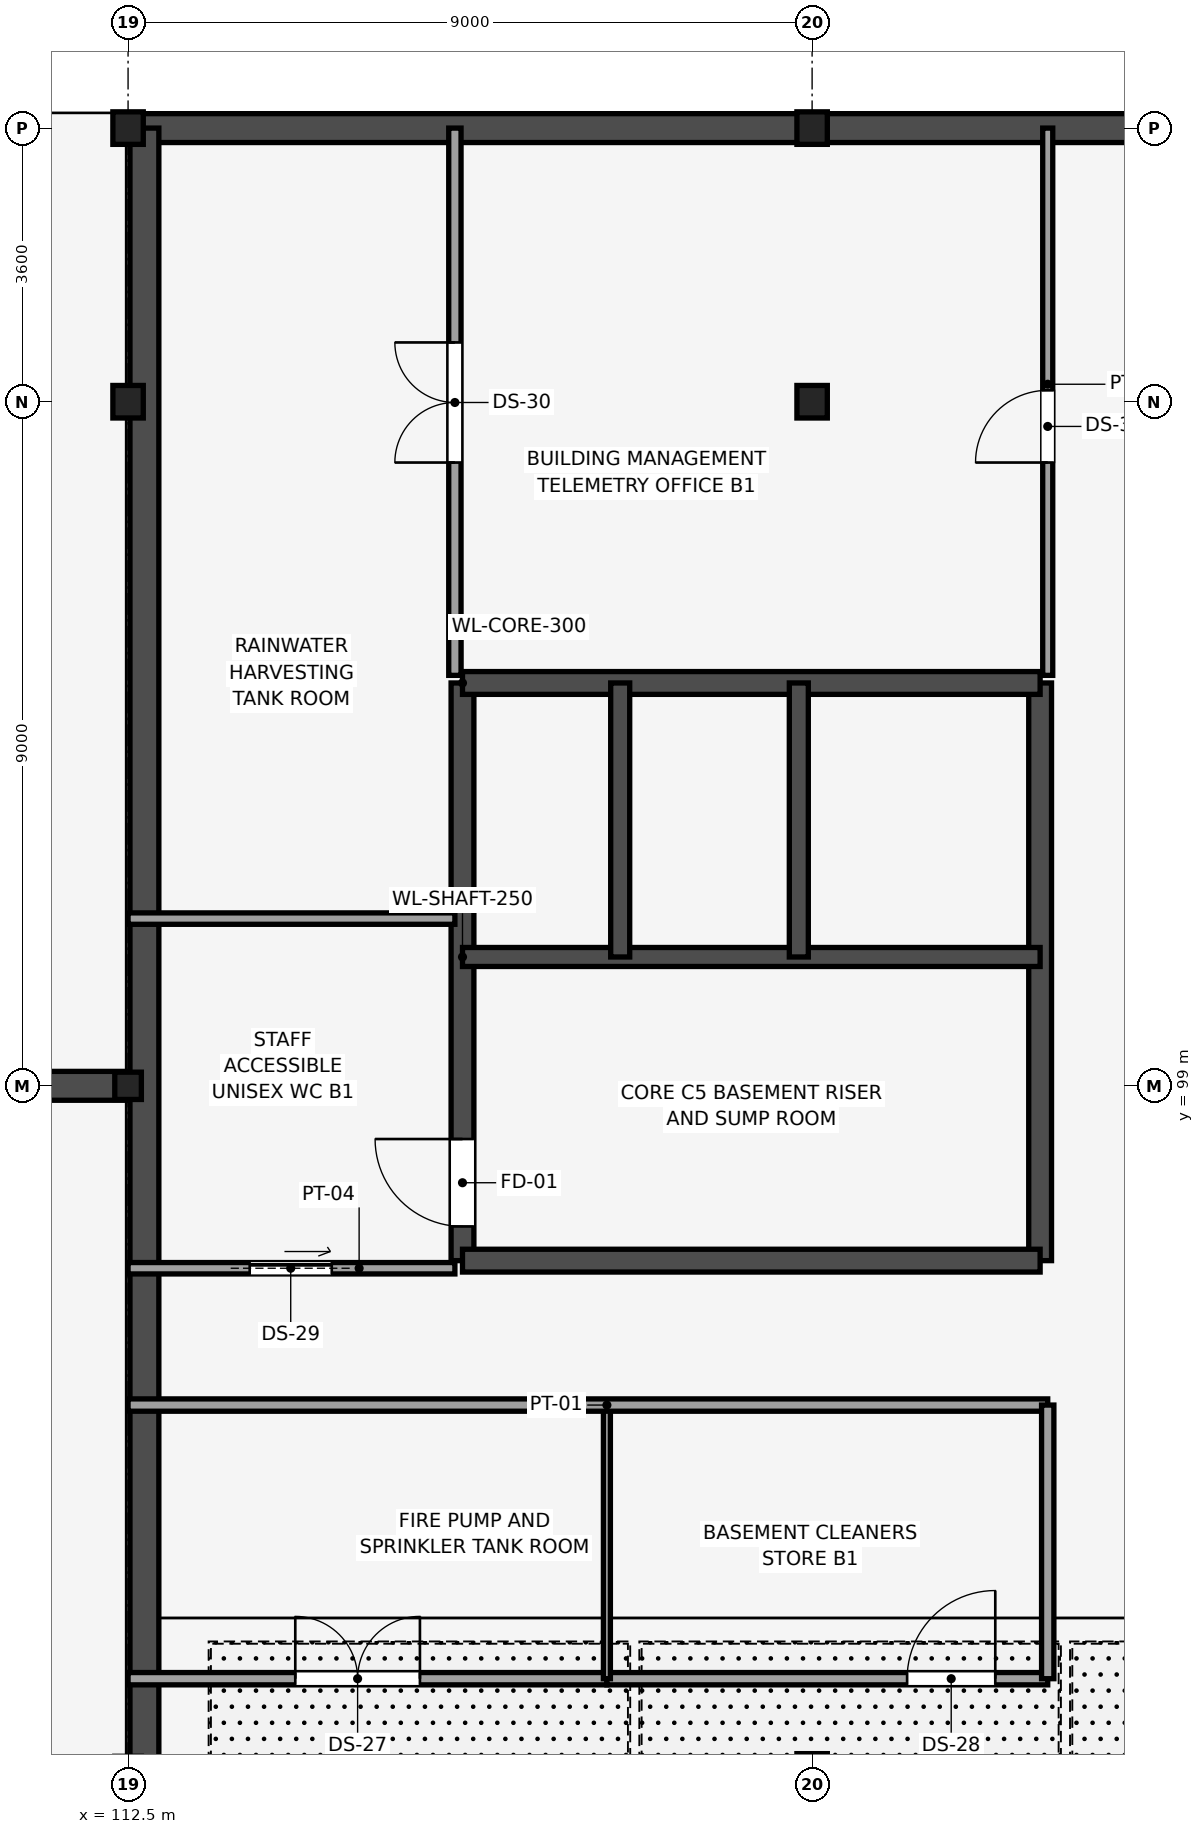
"""IFC4 building model, lengths in metres.
Left out: names, types, materials, properties, quantities, classifications, styles, units other than length and angle.
Written with IfcOpenShell. Run it as: python <this file> out.ifc"""

import sys

from ifc_helpers import new_model, si_unit, direction, frame, frame_2d, origin, origin_2d, place, context, subcontext, project, spatial, rectangle, i_section, extrude, element, fill, save


model = new_model("IFC4")
c1 = context("Model", 3, precision=1e-05, world=origin(), true_north=direction((0.0, 1.0)))
c2 = subcontext(c1, "Body", "Model", "MODEL_VIEW")
j1 = project(units=[si_unit("LENGTHUNIT", "METRE"), si_unit("PLANEANGLEUNIT", "RADIAN")], contexts=[c1])
p1 = place(None, origin())
s1 = spatial("IfcSite", under=j1, at=p1, CompositionType="ELEMENT")
p2 = place(p1, origin())
s2 = spatial("IfcBuilding", under=s1, at=p2, CompositionType="ELEMENT")
p3 = place(p2, frame((0.0, 0.0, -4.5)))
s3 = spatial("IfcBuildingStorey", under=s2, at=p3, CompositionType="ELEMENT", Elevation=-4.5)
p4 = place(p3, frame((112.5, 99.0, 0.0), z_axis=(0.0, 0.0, 1.0), x_axis=(1.0, 0.0, 0.0)))
e1 = element("IfcColumn", 1, at=p4, inside=s3, PredefinedType="COLUMN", context=c2, shape_type="SweptSolid", body=[
    extrude(i_section(OverallWidth=0.35, OverallDepth=0.359, WebThickness=0.016, FlangeThickness=0.024, FilletRadius=0.014, at=origin_2d()), origin(), (0.0, 0.0, 1.0), 4.5),
])
for number, where, z_axis, x_axis in (
    (2, (112.5, 108.0, 0.0), (0.0, 0.0, 1.0), (1.0, 0.0, 0.0)),
    (3, (112.5, 111.6, 0.0), (0.0, 0.0, 1.0), (1.0, 0.0, 0.0)),
    (4, (121.5, 90.0, 0.0), (0.0, 0.0, 1.0), (1.0, 0.0, 0.0)),
    (5, (121.5, 108.0, 0.0), (0.0, 0.0, 1.0), (1.0, 0.0, 0.0)),
    (6, (121.5, 111.6, 0.0), (0.0, 0.0, 1.0), (1.0, 0.0, 0.0)),
):
    element("IfcColumn", number, at=place(p3, frame(where, z_axis=z_axis, x_axis=x_axis)), inside=s3, PredefinedType="COLUMN", context=c2, shape_type="SweptSolid", body=[
        extrude(i_section(OverallWidth=0.4, OverallDepth=0.428, WebThickness=0.02, FlangeThickness=0.028, FilletRadius=0.016, at=origin_2d()), origin(), (0.0, 0.0, 1.0), 4.5),
    ])
p5 = place(p3, frame((116.9, 96.7, 0.0), z_axis=(0.0, 0.0, 1.0), x_axis=(0.0, 1.0, 0.0)))
e7 = element("IfcWall", 7, at=p5, inside=s3, PredefinedType="SHEAR", context=c2, shape_type="SweptSolid", body=[
    extrude(rectangle(XDim=7.6, YDim=0.3, at=frame_2d((3.8, 0.0))), origin(), (0.0, 0.0, 1.0), 4.5),
])
p6 = place(p5, frame((0.45, 0.0, 0.0)))
e8 = element("IfcOpeningElement", 8, at=p6, cuts=e7, PredefinedType="OPENING", context=c2, shape_type="SweptSolid", body=[
    extrude(rectangle(XDim=1.15, YDim=2.15, at=frame_2d((0.575, 1.075))), frame((0.0, 0.16, 0.0), z_axis=(0.0, -1.0, 0.0), x_axis=(1.0, 0.0, 0.0)), (0.0, 0.0, 1.0), 0.32),
])
for number, where, z_axis, x_axis in (
    (9, (124.5, 96.7, 0.0), (0.0, 0.0, 1.0), (0.0, 1.0, 0.0)),
    (10, (116.9, 96.7, 0.0), (0.0, 0.0, 1.0), (1.0, 0.0, 0.0)),
    (11, (116.9, 104.3, 0.0), (0.0, 0.0, 1.0), (1.0, 0.0, 0.0)),
):
    element("IfcWall", number, at=place(p3, frame(where, z_axis=z_axis, x_axis=x_axis)), inside=s3, PredefinedType="SHEAR", context=c2, shape_type="SweptSolid", body=[
        extrude(rectangle(XDim=7.6, YDim=0.3, at=frame_2d((3.8, 0.0))), origin(), (0.0, 0.0, 1.0), 4.5),
    ])
p7 = place(p3, frame((116.9, 100.695, 0.0), z_axis=(0.0, 0.0, 1.0), x_axis=(1.0, 0.0, 0.0)))
e12 = element("IfcWall", 12, at=p7, inside=s3, PredefinedType="SHEAR", context=c2, shape_type="SweptSolid", body=[
    extrude(rectangle(XDim=7.6, YDim=0.25, at=frame_2d((3.8, 0.0))), origin(), (0.0, 0.0, 1.0), 4.5),
])
for number, where, z_axis, x_axis in (
    (13, (118.975, 100.695, 0.0), (0.0, 0.0, 1.0), (0.0, 1.0, 0.0)),
    (14, (121.325, 100.695, 0.0), (0.0, 0.0, 1.0), (0.0, 1.0, 0.0)),
):
    element("IfcWall", number, at=place(p3, frame(where, z_axis=z_axis, x_axis=x_axis)), inside=s3, PredefinedType="SHEAR", context=c2, shape_type="SweptSolid", body=[
        extrude(rectangle(XDim=3.605, YDim=0.25, at=frame_2d((1.802, 0.0))), origin(), (0.0, 0.0, 1.0), 4.5),
    ])
p8 = place(p3, frame((103.5, 99.0, 0.0), z_axis=(0.0, 0.0, 1.0), x_axis=(1.0, 0.0, 0.0)))
e15 = element("IfcWall", 15, at=p8, inside=s3, PredefinedType="SHEAR", context=c2, shape_type="SweptSolid", body=[
    extrude(rectangle(XDim=9.0, YDim=0.38, at=frame_2d((4.5, 0.0))), origin(), (0.0, 0.0, 1.0), 4.26),
])
p9 = place(p3, frame((112.525, 111.6, 0.0), z_axis=(0.0, 0.0, 1.0), x_axis=(1.0, 0.0, 0.0)))
e16 = element("IfcWall", 16, at=p9, inside=s3, PredefinedType="SHEAR", context=c2, shape_type="SweptSolid", body=[
    extrude(rectangle(XDim=35.975, YDim=0.38, at=frame_2d((17.988, 0.0))), origin(), (0.0, 0.0, 1.0), 4.26),
])
p10 = place(p3, frame((112.715, 72.0, 0.0), z_axis=(0.0, 0.0, 1.0), x_axis=(0.0, 1.0, 0.0)))
e17 = element("IfcWall", 17, at=p10, inside=s3, PredefinedType="SHEAR", context=c2, shape_type="SweptSolid", body=[
    extrude(rectangle(XDim=39.6, YDim=0.38, at=frame_2d((19.8, 0.0))), origin(), (0.0, 0.0, 1.0), 4.26),
])
p11 = place(p3, frame((112.5, 91.2, 0.0), z_axis=(0.0, 0.0, 1.0), x_axis=(1.0, 0.0, 0.0)))
e18 = element("IfcWall", 18, at=p11, inside=s3, PredefinedType="PARTITIONING", context=c2, shape_type="SweptSolid", body=[
    extrude(rectangle(XDim=6.3, YDim=0.162, at=frame_2d((3.15, 0.0))), origin(), (0.0, 0.0, 1.0), 4.26),
])
p12 = place(p11, frame((2.2, 0.0, 0.0)))
e19 = element("IfcOpeningElement", 19, at=p12, cuts=e18, PredefinedType="OPENING", context=c2, shape_type="SweptSolid", body=[
    extrude(rectangle(XDim=1.64, YDim=2.25, at=frame_2d((0.82, 1.125))), frame((0.0, 0.091, 0.0), z_axis=(0.0, -1.0, 0.0), x_axis=(1.0, 0.0, 0.0)), (0.0, 0.0, 1.0), 0.182),
])
p13 = place(p3, frame((118.8, 91.2, 0.0), z_axis=(0.0, 0.0, 1.0), x_axis=(1.0, 0.0, 0.0)))
e20 = element("IfcWall", 20, at=p13, inside=s3, PredefinedType="PARTITIONING", context=c2, shape_type="SweptSolid", body=[
    extrude(rectangle(XDim=5.8, YDim=0.162, at=frame_2d((2.9, 0.0))), origin(), (0.0, 0.0, 1.0), 4.26),
])
p14 = place(p13, frame((3.95, 0.0, 0.0)))
e21 = element("IfcOpeningElement", 21, at=p14, cuts=e20, PredefinedType="OPENING", context=c2, shape_type="SweptSolid", body=[
    extrude(rectangle(XDim=1.16, YDim=2.2, at=frame_2d((0.58, 1.1))), frame((0.0, 0.091, 0.0), z_axis=(0.0, -1.0, 0.0), x_axis=(1.0, 0.0, 0.0)), (0.0, 0.0, 1.0), 0.182),
])
p15 = place(p3, frame((118.8, 91.2, 0.0), z_axis=(0.0, 0.0, 1.0), x_axis=(0.0, 1.0, 0.0)))
e22 = element("IfcWall", 22, at=p15, inside=s3, PredefinedType="PARTITIONING", context=c2, shape_type="SweptSolid", body=[
    extrude(rectangle(XDim=3.6, YDim=0.092, at=frame_2d((1.8, 0.0))), origin(), (0.0, 0.0, 1.0), 4.26),
])
p16 = place(p3, frame((112.5, 94.8, 0.0), z_axis=(0.0, 0.0, 1.0), x_axis=(1.0, 0.0, 0.0)))
e23 = element("IfcWall", 23, at=p16, inside=s3, PredefinedType="PARTITIONING", context=c2, shape_type="SweptSolid", body=[
    extrude(rectangle(XDim=12.1, YDim=0.162, at=frame_2d((6.05, 0.0))), origin(), (0.0, 0.0, 1.0), 4.26),
])
p17 = place(p3, frame((124.6, 91.2, 0.0), z_axis=(0.0, 0.0, 1.0), x_axis=(0.0, 1.0, 0.0)))
e24 = element("IfcWall", 24, at=p17, inside=s3, PredefinedType="PARTITIONING", context=c2, shape_type="SweptSolid", body=[
    extrude(rectangle(XDim=3.6, YDim=0.162, at=frame_2d((1.8, 0.0))), origin(), (0.0, 0.0, 1.0), 4.26),
])
p18 = place(p3, frame((112.5, 96.6, 0.0), z_axis=(0.0, 0.0, 1.0), x_axis=(1.0, 0.0, 0.0)))
e25 = element("IfcWall", 25, at=p18, inside=s3, PredefinedType="PARTITIONING", context=c2, shape_type="SweptSolid", body=[
    extrude(rectangle(XDim=4.3, YDim=0.15, at=frame_2d((2.15, 0.0))), origin(), (0.0, 0.0, 1.0), 4.26),
])
p19 = place(p18, frame((1.6, 0.0, 0.0)))
e26 = element("IfcOpeningElement", 26, at=p19, cuts=e25, PredefinedType="OPENING", context=c2, shape_type="SweptSolid", body=[
    extrude(rectangle(XDim=1.08, YDim=2.2, at=frame_2d((0.54, 1.1))), frame((0.0, 0.085, 0.0), z_axis=(0.0, -1.0, 0.0), x_axis=(1.0, 0.0, 0.0)), (0.0, 0.0, 1.0), 0.17),
])
p20 = place(p3, frame((112.5, 101.2, 0.0), z_axis=(0.0, 0.0, 1.0), x_axis=(1.0, 0.0, 0.0)))
e27 = element("IfcWall", 27, at=p20, inside=s3, PredefinedType="PARTITIONING", context=c2, shape_type="SweptSolid", body=[
    extrude(rectangle(XDim=4.3, YDim=0.15, at=frame_2d((2.15, 0.0))), origin(), (0.0, 0.0, 1.0), 4.26),
])
p21 = place(p3, frame((116.8, 104.4, 0.0), z_axis=(0.0, 0.0, 1.0), x_axis=(0.0, 1.0, 0.0)))
e28 = element("IfcWall", 28, at=p21, inside=s3, PredefinedType="PARTITIONING", context=c2, shape_type="SweptSolid", body=[
    extrude(rectangle(XDim=7.2, YDim=0.162, at=frame_2d((3.6, 0.0))), origin(), (0.0, 0.0, 1.0), 4.26),
])
p22 = place(p21, frame((2.8, 0.0, 0.0)))
e29 = element("IfcOpeningElement", 29, at=p22, cuts=e28, PredefinedType="OPENING", context=c2, shape_type="SweptSolid", body=[
    extrude(rectangle(XDim=1.58, YDim=2.275, at=frame_2d((0.79, 1.137))), frame((0.0, 0.091, 0.0), z_axis=(0.0, -1.0, 0.0), x_axis=(1.0, 0.0, 0.0)), (0.0, 0.0, 1.0), 0.182),
])
p23 = place(p3, frame((124.6, 104.4, 0.0), z_axis=(0.0, 0.0, 1.0), x_axis=(0.0, 1.0, 0.0)))
e30 = element("IfcWall", 30, at=p23, inside=s3, PredefinedType="PARTITIONING", context=c2, shape_type="SweptSolid", body=[
    extrude(rectangle(XDim=7.2, YDim=0.132, at=frame_2d((3.6, 0.0))), origin(), (0.0, 0.0, 1.0), 4.26),
])
p24 = place(p23, frame((2.8, 0.0, 0.0)))
e31 = element("IfcOpeningElement", 31, at=p24, cuts=e30, PredefinedType="OPENING", context=c2, shape_type="SweptSolid", body=[
    extrude(rectangle(XDim=0.95, YDim=2.225, at=frame_2d((0.475, 1.113))), frame((0.0, 0.076, 0.0), z_axis=(0.0, -1.0, 0.0), x_axis=(1.0, 0.0, 0.0)), (0.0, 0.0, 1.0), 0.152),
])
p25 = place(p6, origin())
e32 = element("IfcDoor", 32, at=p25, inside=s3, OperationType="SINGLE_SWING_RIGHT", PredefinedType="DOOR", context=c2, shape_type="SweptSolid", body=[
    extrude(rectangle(XDim=1.15, YDim=2.15, at=frame_2d((0.575, 1.075))), frame((0.0, 0.025, 0.0), z_axis=(0.0, -1.0, 0.0), x_axis=(1.0, 0.0, 0.0)), (0.0, 0.0, 1.0), 0.05),
])
fill(e8, e32)
p26 = place(p12, origin())
e33 = element("IfcDoor", 33, at=p26, inside=s3, OperationType="DOUBLE_DOOR_SINGLE_SWING", PredefinedType="DOOR", context=c2, shape_type="SweptSolid", body=[
    extrude(rectangle(XDim=1.64, YDim=2.25, at=frame_2d((0.82, 1.125))), frame((0.0, 0.025, 0.0), z_axis=(0.0, -1.0, 0.0), x_axis=(1.0, 0.0, 0.0)), (0.0, 0.0, 1.0), 0.05),
])
fill(e19, e33)
p27 = place(p14, origin())
e34 = element("IfcDoor", 34, at=p27, inside=s3, OperationType="SINGLE_SWING_RIGHT", PredefinedType="DOOR", context=c2, shape_type="SweptSolid", body=[
    extrude(rectangle(XDim=1.16, YDim=2.2, at=frame_2d((0.58, 1.1))), frame((0.0, 0.025, 0.0), z_axis=(0.0, -1.0, 0.0), x_axis=(1.0, 0.0, 0.0)), (0.0, 0.0, 1.0), 0.05),
])
fill(e21, e34)
p28 = place(p19, origin())
e35 = element("IfcDoor", 35, at=p28, inside=s3, OperationType="SLIDING_TO_LEFT", PredefinedType="DOOR", context=c2, shape_type="SweptSolid", body=[
    extrude(rectangle(XDim=1.08, YDim=2.2, at=frame_2d((0.54, 1.1))), frame((0.0, 0.025, 0.0), z_axis=(0.0, -1.0, 0.0), x_axis=(1.0, 0.0, 0.0)), (0.0, 0.0, 1.0), 0.05),
])
fill(e26, e35)
p29 = place(p22, origin())
e36 = element("IfcDoor", 36, at=p29, inside=s3, OperationType="DOUBLE_DOOR_SINGLE_SWING", PredefinedType="DOOR", context=c2, shape_type="SweptSolid", body=[
    extrude(rectangle(XDim=1.58, YDim=2.275, at=frame_2d((0.79, 1.137))), frame((0.0, 0.025, 0.0), z_axis=(0.0, -1.0, 0.0), x_axis=(1.0, 0.0, 0.0)), (0.0, 0.0, 1.0), 0.05),
])
fill(e29, e36)
p30 = place(p24, origin())
e37 = element("IfcDoor", 37, at=p30, inside=s3, OperationType="SINGLE_SWING_LEFT", PredefinedType="DOOR", context=c2, shape_type="SweptSolid", body=[
    extrude(rectangle(XDim=0.95, YDim=2.225, at=frame_2d((0.475, 1.113))), frame((0.0, 0.025, 0.0), z_axis=(0.0, -1.0, 0.0), x_axis=(1.0, 0.0, 0.0)), (0.0, 0.0, 1.0), 0.05),
])
fill(e31, e37)
save(model, sys.argv[1])
